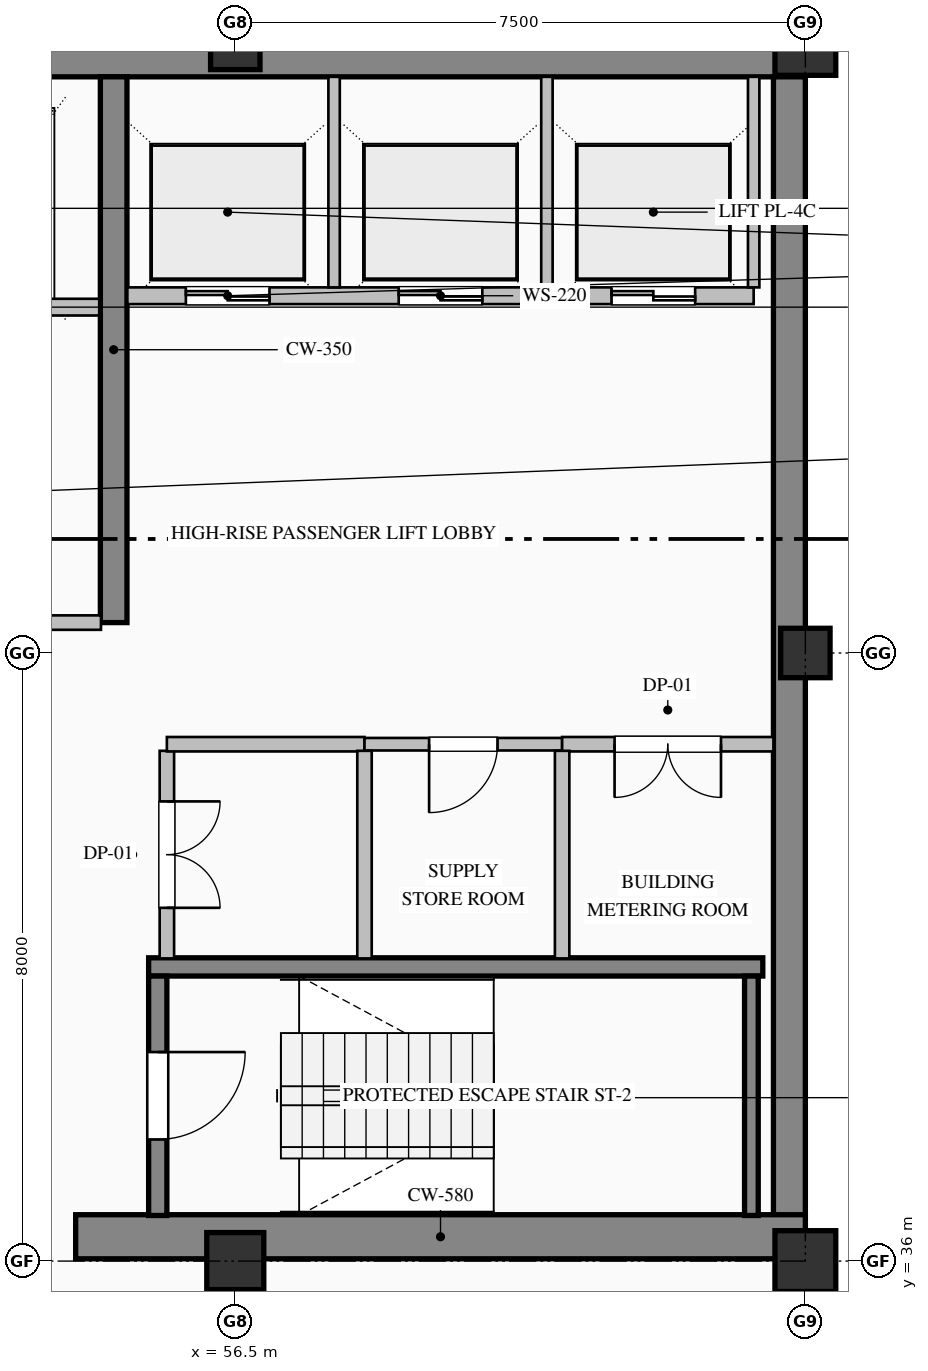
"""IFC4 building model, lengths in metres.
Left out: names, types, materials, properties, quantities, classifications, styles, units other than length and angle.
Written with IfcOpenShell. Run it as: python <this file> out.ifc"""

import sys

from ifc_helpers import new_model, si_unit, direction, frame, frame_2d, origin, origin_2d, place, context, subcontext, project, spatial, rectangle, hollow_rectangle, extrude, element, fill, save


model = new_model("IFC4")
c1 = context("Model", 3, precision=1e-05, world=origin(), true_north=direction((0.0, 1.0)))
c2 = subcontext(c1, "Body", "Model", "MODEL_VIEW")
j1 = project(units=[si_unit("LENGTHUNIT", "METRE"), si_unit("PLANEANGLEUNIT", "RADIAN")], contexts=[c1])
p1 = place(None, origin())
s1 = spatial("IfcSite", under=j1, at=p1, CompositionType="ELEMENT")
p2 = place(p1, origin())
s2 = spatial("IfcBuilding", under=s1, at=p2, CompositionType="ELEMENT")
p3 = place(p2, frame((0.0, 0.0, 323.2)))
s3 = spatial("IfcBuildingStorey", under=s2, at=p3, CompositionType="ELEMENT", Elevation=323.2)
p4 = place(p3, frame((40.5, 51.79, 0.0), z_axis=(0.0, 0.0, 1.0), x_axis=(1.0, 0.0, 0.0)))
e1 = element("IfcWall", 1, at=p4, inside=s3, PredefinedType="SHEAR", context=c2, shape_type="SweptSolid", body=[
    extrude(rectangle(XDim=23.5, YDim=0.42, at=frame_2d((11.75, 0.0))), origin(), (0.0, 0.0, 1.0), 3.785),
])
p5 = place(p3, frame((63.79, 36.32, 0.0), z_axis=(0.0, 0.0, 1.0), x_axis=(0.0, 1.0, 0.0)))
e2 = element("IfcWall", 2, at=p5, inside=s3, PredefinedType="SHEAR", context=c2, shape_type="SweptSolid", body=[
    extrude(rectangle(XDim=15.26, YDim=0.42, at=frame_2d((7.63, 0.0))), origin(), (0.0, 0.0, 1.0), 3.785),
])
p6 = place(p3, frame((54.4, 36.32, 0.0), z_axis=(0.0, 0.0, 1.0), x_axis=(1.0, 0.0, 0.0)))
e3 = element("IfcWall", 3, at=p6, inside=s3, PredefinedType="SHEAR", context=c2, shape_type="SweptSolid", body=[
    extrude(rectangle(XDim=9.6, YDim=0.58, at=frame_2d((4.8, 0.0))), origin(), (0.0, 0.0, 1.0), 4.0),
])
p7 = place(p3, frame((54.9, 44.4, 0.0), z_axis=(0.0, 0.0, 1.0), x_axis=(0.0, 1.0, 0.0)))
e4 = element("IfcWall", 4, at=p7, inside=s3, PredefinedType="SHEAR", context=c2, shape_type="SweptSolid", body=[
    extrude(rectangle(XDim=7.18, YDim=0.35, at=frame_2d((3.59, 0.0))), origin(), (0.0, 0.0, 1.0), 3.785),
])
p8 = place(p3, frame((56.5, 36.0, 0.0), z_axis=(0.0, 0.0, 1.0), x_axis=(1.0, 0.0, 0.0)))
e5 = element("IfcColumn", 5, at=p8, inside=s3, PredefinedType="COLUMN", context=c2, shape_type="SweptSolid", body=[
    extrude(rectangle(XDim=0.75, YDim=0.75, at=origin_2d()), origin(), (0.0, 0.0, 1.0), 4.0),
])
p9 = place(p3, frame((56.5, 52.0, 0.0), z_axis=(0.0, 0.0, 1.0), x_axis=(1.0, 0.0, 0.0)))
e6 = element("IfcColumn", 6, at=p9, inside=s3, PredefinedType="COLUMN", context=c2, shape_type="SweptSolid", body=[
    extrude(hollow_rectangle(XDim=0.65, YDim=0.65, WallThickness=0.028, at=origin_2d()), origin(), (0.0, 0.0, 1.0), 4.0),
])
p10 = place(p3, frame((64.0, 36.0, 0.0), z_axis=(0.0, 0.0, 1.0), x_axis=(1.0, 0.0, 0.0)))
e7 = element("IfcColumn", 7, at=p10, inside=s3, PredefinedType="COLUMN", context=c2, shape_type="SweptSolid", body=[
    extrude(hollow_rectangle(XDim=0.8, YDim=0.8, WallThickness=0.032, at=origin_2d()), origin(), (0.0, 0.0, 1.0), 4.0),
])
p11 = place(p3, frame((64.0, 44.0, 0.0), z_axis=(0.0, 0.0, 1.0), x_axis=(1.0, 0.0, 0.0)))
e8 = element("IfcColumn", 8, at=p11, inside=s3, PredefinedType="COLUMN", context=c2, shape_type="SweptSolid", body=[
    extrude(hollow_rectangle(XDim=0.65, YDim=0.65, WallThickness=0.028, at=origin_2d()), origin(), (0.0, 0.0, 1.0), 4.0),
])
p12 = place(p3, frame((64.0, 52.0, 0.0), z_axis=(0.0, 0.0, 1.0), x_axis=(1.0, 0.0, 0.0)))
e9 = element("IfcColumn", 9, at=p12, inside=s3, PredefinedType="COLUMN", context=c2, shape_type="SweptSolid", body=[
    extrude(hollow_rectangle(XDim=0.8, YDim=0.8, WallThickness=0.032, at=origin_2d()), origin(), (0.0, 0.0, 1.0), 4.0),
])
p13 = place(p3, frame((63.82, 36.05, 0.0), z_axis=(0.0, 0.0, 1.0), x_axis=(0.0, -1.0, 0.0)))
e10 = element("IfcWall", 10, at=p13, inside=s3, PredefinedType="SOLIDWALL", context=c2, shape_type="SweptSolid", body=[
    extrude(rectangle(XDim=13.55, YDim=0.36, at=frame_2d((6.775, 0.0))), origin(), (0.0, 0.0, 1.0), 3.335),
])
p14 = place(p13, frame((3.125, 0.0, 0.9)))
e11 = element("IfcOpeningElement", 11, at=p14, cuts=e10, PredefinedType="OPENING", context=c2, shape_type="SweptSolid", body=[
    extrude(rectangle(XDim=0.95, YDim=1.85, at=frame_2d((0.475, 0.925))), frame((0.0, 0.19, 0.0), z_axis=(0.0, -1.0, 0.0), x_axis=(1.0, 0.0, 0.0)), (0.0, 0.0, 1.0), 0.38),
])
p15 = place(p3, frame((55.36, 39.87, 0.0), z_axis=(0.0, 0.0, 1.0), x_axis=(1.0, 0.0, 0.0)))
e12 = element("IfcWall", 12, at=p15, inside=s3, PredefinedType="SOLIDWALL", context=c2, shape_type="SweptSolid", body=[
    extrude(rectangle(XDim=8.08, YDim=0.24, at=frame_2d((4.04, 0.0))), origin(), (0.0, 0.0, 1.0), 4.0),
])
p16 = place(p3, frame((55.48, 39.75, 0.0), z_axis=(0.0, 0.0, 1.0), x_axis=(0.0, -1.0, 0.0)))
e13 = element("IfcWall", 13, at=p16, inside=s3, PredefinedType="SOLIDWALL", context=c2, shape_type="SweptSolid", body=[
    extrude(rectangle(XDim=3.15, YDim=0.24, at=frame_2d((1.575, 0.0))), origin(), (0.0, 0.0, 1.0), 4.0),
])
p17 = place(p16, frame((1.0, 0.0, 0.0)))
e14 = element("IfcOpeningElement", 14, at=p17, cuts=e13, PredefinedType="OPENING", context=c2, shape_type="SweptSolid", body=[
    extrude(rectangle(XDim=1.15, YDim=2.2, at=frame_2d((0.575, 1.1))), frame((0.0, 0.13, 0.0), z_axis=(0.0, -1.0, 0.0), x_axis=(1.0, 0.0, 0.0)), (0.0, 0.0, 1.0), 0.26),
])
p18 = place(p3, frame((63.29, 36.6, 0.0), z_axis=(0.0, 0.0, 1.0), x_axis=(0.0, 1.0, 0.0)))
e15 = element("IfcWall", 15, at=p18, inside=s3, PredefinedType="SOLIDWALL", context=c2, shape_type="SweptSolid", body=[
    extrude(rectangle(XDim=3.15, YDim=0.18, at=frame_2d((1.575, 0.0))), origin(), (0.0, 0.0, 1.0), 4.0),
])
p19 = place(p3, frame((54.71, 48.55, 0.0), z_axis=(0.0, 0.0, 1.0), x_axis=(-1.0, 0.0, 0.0)))
e16 = element("IfcWall", 16, at=p19, inside=s3, PredefinedType="PARTITIONING", context=c2, shape_type="SweptSolid", body=[
    extrude(rectangle(XDim=5.12, YDim=0.22, at=frame_2d((2.56, 0.0))), origin(), (0.0, 0.0, 1.0), 3.785),
])
p20 = place(p19, frame((3.735, 0.0, 0.0)))
e17 = element("IfcOpeningElement", 17, at=p20, cuts=e16, PredefinedType="OPENING", context=c2, shape_type="SweptSolid", body=[
    extrude(rectangle(XDim=1.15, YDim=2.2, at=frame_2d((0.575, 1.1))), frame((0.0, 0.12, 0.0), z_axis=(0.0, -1.0, 0.0), x_axis=(1.0, 0.0, 0.0)), (0.0, 0.0, 1.0), 0.24),
])
p21 = place(p19, frame((0.935, 0.0, 0.0)))
e18 = element("IfcOpeningElement", 18, at=p21, cuts=e16, PredefinedType="OPENING", context=c2, shape_type="SweptSolid", body=[
    extrude(rectangle(XDim=1.15, YDim=2.2, at=frame_2d((0.575, 1.1))), frame((0.0, 0.12, 0.0), z_axis=(0.0, -1.0, 0.0), x_axis=(1.0, 0.0, 0.0)), (0.0, 0.0, 1.0), 0.24),
])
p22 = place(p3, frame((63.32, 48.7, 0.0), z_axis=(0.0, 0.0, 1.0), x_axis=(-1.0, 0.0, 0.0)))
e19 = element("IfcWall", 19, at=p22, inside=s3, PredefinedType="PARTITIONING", context=c2, shape_type="SweptSolid", body=[
    extrude(rectangle(XDim=8.24, YDim=0.22, at=frame_2d((4.12, 0.0))), origin(), (0.0, 0.0, 1.0), 3.785),
])
p23 = place(p22, frame((6.37, 0.0, 0.0)))
e20 = element("IfcOpeningElement", 20, at=p23, cuts=e19, PredefinedType="OPENING", context=c2, shape_type="SweptSolid", body=[
    extrude(rectangle(XDim=1.1, YDim=2.2, at=frame_2d((0.55, 1.1))), frame((0.0, 0.12, 0.0), z_axis=(0.0, -1.0, 0.0), x_axis=(1.0, 0.0, 0.0)), (0.0, 0.0, 1.0), 0.24),
])
p24 = place(p22, frame((3.57, 0.0, 0.0)))
e21 = element("IfcOpeningElement", 21, at=p24, cuts=e19, PredefinedType="OPENING", context=c2, shape_type="SweptSolid", body=[
    extrude(rectangle(XDim=1.1, YDim=2.2, at=frame_2d((0.55, 1.1))), frame((0.0, 0.12, 0.0), z_axis=(0.0, -1.0, 0.0), x_axis=(1.0, 0.0, 0.0)), (0.0, 0.0, 1.0), 0.24),
])
p25 = place(p22, frame((0.77, 0.0, 0.0)))
e22 = element("IfcOpeningElement", 22, at=p25, cuts=e19, PredefinedType="OPENING", context=c2, shape_type="SweptSolid", body=[
    extrude(rectangle(XDim=1.1, YDim=2.2, at=frame_2d((0.55, 1.1))), frame((0.0, 0.12, 0.0), z_axis=(0.0, -1.0, 0.0), x_axis=(1.0, 0.0, 0.0)), (0.0, 0.0, 1.0), 0.24),
])
for number, where, z_axis, x_axis in (
    (23, (57.8, 48.81, 0.0), (0.0, 0.0, 1.0), (0.0, 1.0, 0.0)),
    (24, (60.6, 48.81, 0.0), (0.0, 0.0, 1.0), (0.0, 1.0, 0.0)),
    (25, (63.32, 48.81, 0.0), (0.0, 0.0, 1.0), (0.0, 1.0, 0.0)),
):
    element("IfcWall", number, at=place(p3, frame(where, z_axis=z_axis, x_axis=x_axis)), inside=s3, PredefinedType="PARTITIONING", context=c2, shape_type="SweptSolid", body=[
        extrude(rectangle(XDim=2.77, YDim=0.15, at=frame_2d((1.385, 0.0))), origin(), (0.0, 0.0, 1.0), 3.785),
    ])
p26 = place(p3, frame((54.733, 44.4, 0.0), z_axis=(0.0, 0.0, 1.0), x_axis=(-1.0, 0.0, 0.0)))
e26 = element("IfcWall", 26, at=p26, inside=s3, PredefinedType="PARTITIONING", context=c2, shape_type="SweptSolid", body=[
    extrude(rectangle(XDim=5.166, YDim=0.19, at=frame_2d((2.583, 0.0))), origin(), (0.0, 0.0, 1.0), 3.785),
])
p27 = place(p26, frame((2.058, 0.0, 0.0)))
e27 = element("IfcOpeningElement", 27, at=p27, cuts=e26, PredefinedType="OPENING", context=c2, shape_type="SweptSolid", body=[
    extrude(rectangle(XDim=1.05, YDim=2.15, at=frame_2d((0.525, 1.075))), frame((0.0, 0.105, 0.0), z_axis=(0.0, -1.0, 0.0), x_axis=(1.0, 0.0, 0.0)), (0.0, 0.0, 1.0), 0.21),
])
p28 = place(p3, frame((55.6, 42.713, 0.0), z_axis=(0.0, 0.0, 1.0), x_axis=(0.0, -1.0, 0.0)))
e28 = element("IfcWall", 28, at=p28, inside=s3, PredefinedType="PARTITIONING", context=c2, shape_type="SweptSolid", body=[
    extrude(rectangle(XDim=2.731, YDim=0.19, at=frame_2d((1.365, 0.0))), origin(), (0.0, 0.0, 1.0), 3.785),
])
p29 = place(p28, frame((0.666, 0.0, 0.0)))
e29 = element("IfcOpeningElement", 29, at=p29, cuts=e28, PredefinedType="OPENING", context=c2, shape_type="SweptSolid", body=[
    extrude(rectangle(XDim=1.4, YDim=2.25, at=frame_2d((0.7, 1.125))), frame((0.0, 0.105, 0.0), z_axis=(0.0, -1.0, 0.0), x_axis=(1.0, 0.0, 0.0)), (0.0, 0.0, 1.0), 0.21),
])
p30 = place(p3, frame((58.2, 42.8, 0.0), z_axis=(0.0, 0.0, 1.0), x_axis=(-1.0, 0.0, 0.0)))
e30 = element("IfcWall", 30, at=p30, inside=s3, PredefinedType="PARTITIONING", context=c2, shape_type="SweptSolid", body=[
    extrude(rectangle(XDim=2.6, YDim=0.19, at=frame_2d((1.3, 0.0))), origin(), (0.0, 0.0, 1.0), 3.785),
])
p31 = place(p3, frame((60.8, 42.8, 0.0), z_axis=(0.0, 0.0, 1.0), x_axis=(-1.0, 0.0, 0.0)))
e31 = element("IfcWall", 31, at=p31, inside=s3, PredefinedType="PARTITIONING", context=c2, shape_type="SweptSolid", body=[
    extrude(rectangle(XDim=2.6, YDim=0.165, at=frame_2d((1.3, 0.0))), origin(), (0.0, 0.0, 1.0), 3.785),
])
p32 = place(p31, frame((0.85, 0.0, 0.0)))
e32 = element("IfcOpeningElement", 32, at=p32, cuts=e31, PredefinedType="OPENING", context=c2, shape_type="SweptSolid", body=[
    extrude(rectangle(XDim=0.9, YDim=2.15, at=frame_2d((0.45, 1.075))), frame((0.0, 0.093, 0.0), z_axis=(0.0, -1.0, 0.0), x_axis=(1.0, 0.0, 0.0)), (0.0, 0.0, 1.0), 0.185),
])
p33 = place(p3, frame((63.58, 42.8, 0.0), z_axis=(0.0, 0.0, 1.0), x_axis=(-1.0, 0.0, 0.0)))
e33 = element("IfcWall", 33, at=p33, inside=s3, PredefinedType="PARTITIONING", context=c2, shape_type="SweptSolid", body=[
    extrude(rectangle(XDim=2.78, YDim=0.19, at=frame_2d((1.39, 0.0))), origin(), (0.0, 0.0, 1.0), 3.785),
])
p34 = place(p33, frame((0.69, 0.0, 0.0)))
e34 = element("IfcOpeningElement", 34, at=p34, cuts=e33, PredefinedType="OPENING", context=c2, shape_type="SweptSolid", body=[
    extrude(rectangle(XDim=1.4, YDim=2.25, at=frame_2d((0.7, 1.125))), frame((0.0, 0.105, 0.0), z_axis=(0.0, -1.0, 0.0), x_axis=(1.0, 0.0, 0.0)), (0.0, 0.0, 1.0), 0.21),
])
for number, where, z_axis, x_axis in (
    (35, (58.2, 42.713, 0.0), (0.0, 0.0, 1.0), (0.0, -1.0, 0.0)),
    (36, (60.8, 42.713, 0.0), (0.0, 0.0, 1.0), (0.0, -1.0, 0.0)),
):
    element("IfcWall", number, at=place(p3, frame(where, z_axis=z_axis, x_axis=x_axis)), inside=s3, PredefinedType="PARTITIONING", context=c2, shape_type="SweptSolid", body=[
        extrude(rectangle(XDim=2.731, YDim=0.19, at=frame_2d((1.365, 0.0))), origin(), (0.0, 0.0, 1.0), 3.785),
    ])
p35 = place(p3, frame((56.5, 36.0, 0.0), z_axis=(0.0, 0.0, 1.0), x_axis=(0.0, -1.0, 0.0)))
e37 = element("IfcWall", 37, at=p35, inside=s3, PredefinedType="PARTITIONING", context=c2, shape_type="SweptSolid", body=[
    extrude(rectangle(XDim=2.325, YDim=0.165, at=frame_2d((1.163, 0.0))), origin(), (0.0, 0.0, 1.0), 3.177),
])
p36 = place(p17, origin())
e38 = element("IfcDoor", 38, at=p36, inside=s3, OperationType="SINGLE_SWING_LEFT", PredefinedType="DOOR", context=c2, shape_type="SweptSolid", body=[
    extrude(rectangle(XDim=1.15, YDim=2.2, at=frame_2d((0.575, 1.1))), frame((0.0, 0.025, 0.0), z_axis=(0.0, -1.0, 0.0), x_axis=(1.0, 0.0, 0.0)), (0.0, 0.0, 1.0), 0.05),
])
fill(e14, e38)
p37 = place(p23, origin())
e39 = element("IfcDoor", 39, at=p37, inside=s3, OperationType="DOUBLE_DOOR_SLIDING", PredefinedType="DOOR", context=c2, shape_type="SweptSolid", body=[
    extrude(rectangle(XDim=1.1, YDim=2.2, at=frame_2d((0.55, 1.1))), frame((0.0, 0.025, 0.0), z_axis=(0.0, -1.0, 0.0), x_axis=(1.0, 0.0, 0.0)), (0.0, 0.0, 1.0), 0.05),
])
fill(e20, e39)
p38 = place(p24, origin())
e40 = element("IfcDoor", 40, at=p38, inside=s3, OperationType="DOUBLE_DOOR_SLIDING", PredefinedType="DOOR", context=c2, shape_type="SweptSolid", body=[
    extrude(rectangle(XDim=1.1, YDim=2.2, at=frame_2d((0.55, 1.1))), frame((0.0, 0.025, 0.0), z_axis=(0.0, -1.0, 0.0), x_axis=(1.0, 0.0, 0.0)), (0.0, 0.0, 1.0), 0.05),
])
fill(e21, e40)
p39 = place(p25, origin())
e41 = element("IfcDoor", 41, at=p39, inside=s3, OperationType="DOUBLE_DOOR_SLIDING", PredefinedType="DOOR", context=c2, shape_type="SweptSolid", body=[
    extrude(rectangle(XDim=1.1, YDim=2.2, at=frame_2d((0.55, 1.1))), frame((0.0, 0.025, 0.0), z_axis=(0.0, -1.0, 0.0), x_axis=(1.0, 0.0, 0.0)), (0.0, 0.0, 1.0), 0.05),
])
fill(e22, e41)
p40 = place(p29, origin())
e42 = element("IfcDoor", 42, at=p40, inside=s3, OperationType="DOUBLE_DOOR_SINGLE_SWING", PredefinedType="DOOR", context=c2, shape_type="SweptSolid", body=[
    extrude(rectangle(XDim=1.4, YDim=2.25, at=frame_2d((0.7, 1.125))), frame((0.0, 0.025, 0.0), z_axis=(0.0, -1.0, 0.0), x_axis=(1.0, 0.0, 0.0)), (0.0, 0.0, 1.0), 0.05),
])
fill(e29, e42)
p41 = place(p32, origin())
e43 = element("IfcDoor", 43, at=p41, inside=s3, OperationType="SINGLE_SWING_RIGHT", PredefinedType="DOOR", context=c2, shape_type="SweptSolid", body=[
    extrude(rectangle(XDim=0.9, YDim=2.15, at=frame_2d((0.45, 1.075))), frame((0.0, 0.025, 0.0), z_axis=(0.0, -1.0, 0.0), x_axis=(1.0, 0.0, 0.0)), (0.0, 0.0, 1.0), 0.05),
])
fill(e32, e43)
p42 = place(p34, origin())
e44 = element("IfcDoor", 44, at=p42, inside=s3, OperationType="DOUBLE_DOOR_SINGLE_SWING", PredefinedType="DOOR", context=c2, shape_type="SweptSolid", body=[
    extrude(rectangle(XDim=1.4, YDim=2.25, at=frame_2d((0.7, 1.125))), frame((0.0, 0.025, 0.0), z_axis=(0.0, -1.0, 0.0), x_axis=(1.0, 0.0, 0.0)), (0.0, 0.0, 1.0), 0.05),
])
fill(e34, e44)
save(model, sys.argv[1])
